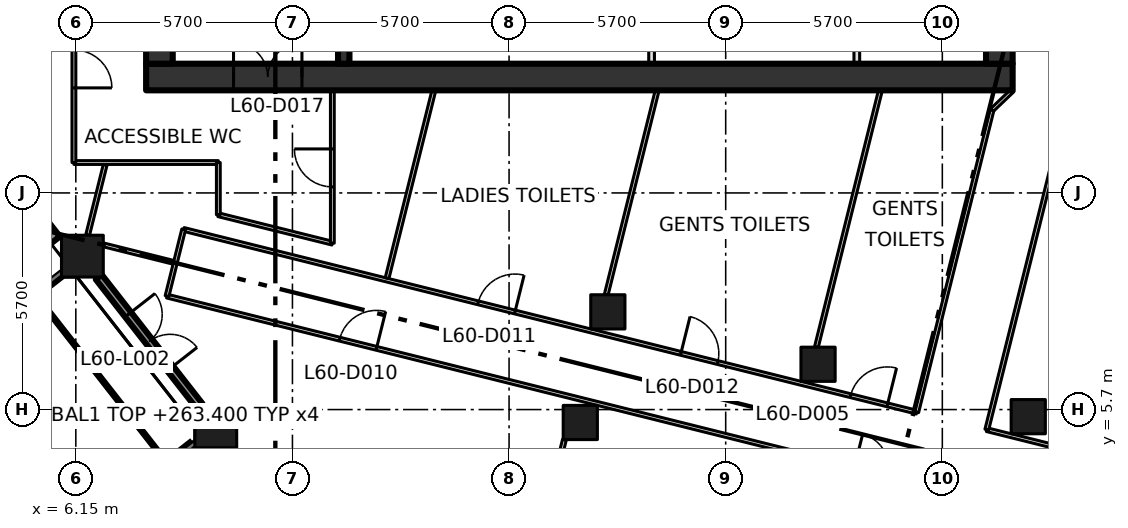
"""IFC4 building model, lengths in metres.
Left out: names, types, materials, properties, quantities, classifications, styles, units other than length and angle.
Written with IfcOpenShell. Run it as: python <this file> out.ifc"""

import sys

from ifc_helpers import new_model, si_unit, direction, frame, frame_2d, origin, origin_2d, place, context, subcontext, project, spatial, rectangle, extrude, element, fill, save


model = new_model("IFC4")
c1 = context("Model", 3, precision=1e-05, world=origin(), true_north=direction((0.0, 1.0)))
c2 = subcontext(c1, "Body", "Model", "MODEL_VIEW")
j1 = project(units=[si_unit("LENGTHUNIT", "METRE"), si_unit("PLANEANGLEUNIT", "RADIAN")], contexts=[c1])
p1 = place(None, origin())
s1 = spatial("IfcSite", under=j1, at=p1, CompositionType="ELEMENT")
p2 = place(p1, origin())
s2 = spatial("IfcBuilding", under=s1, at=p2, CompositionType="ELEMENT")
p3 = place(p2, frame((0.0, 0.0, 263.4)))
s3 = spatial("IfcBuildingStorey", under=s2, at=p3, CompositionType="ELEMENT", Elevation=263.4)
for number, where, z_axis, x_axis in (
    (1, (9.833, 5.245, 0.0), (0.0, 0.0, 1.0), (1.0, 0.0, 0.0)),
    (2, (6.323, 9.737, 0.0), (0.0, 0.0, 1.0), (1.0, 0.0, 0.0)),
):
    element("IfcColumn", number, at=place(p3, frame(where, z_axis=z_axis, x_axis=x_axis)), inside=s3, PredefinedType="COLUMN", context=c2, shape_type="SweptSolid", body=[
        extrude(rectangle(XDim=1.1, YDim=1.1, at=origin_2d()), origin(), (0.0, 0.0, 1.0), 4.2),
    ])
for number, where, z_axis, x_axis in (
    (3, (19.424, 5.36, 0.0), (0.0, 0.0, 1.0), (1.0, 0.0, 0.0)),
    (4, (20.149, 8.271, 0.0), (0.0, 0.0, 1.0), (1.0, 0.0, 0.0)),
    (5, (25.68, 6.892, 0.0), (0.0, 0.0, 1.0), (1.0, 0.0, 0.0)),
    (6, (31.211, 5.513, 0.0), (0.0, 0.0, 1.0), (1.0, 0.0, 0.0)),
):
    element("IfcColumn", number, at=place(p3, frame(where, z_axis=z_axis, x_axis=x_axis)), inside=s3, PredefinedType="COLUMN", context=c2, shape_type="SweptSolid", body=[
        extrude(rectangle(XDim=0.9, YDim=0.9, at=origin_2d()), origin(), (0.0, 0.0, 1.0), 4.2),
    ])
p4 = place(p3, frame((8.0, 14.45, -0.3), z_axis=(0.0, 0.0, 1.0), x_axis=(1.0, 0.0, 0.0)))
e7 = element("IfcWall", 7, at=p4, inside=s3, PredefinedType="SHEAR", context=c2, shape_type="SweptSolid", body=[
    extrude(rectangle(XDim=22.8, YDim=0.7, at=frame_2d((11.4, 0.0))), origin(), (0.0, 0.0, 1.0), 4.2),
])
p5 = place(p4, frame((2.3, 0.0, 0.3)))
e8 = element("IfcOpeningElement", 8, at=p5, cuts=e7, PredefinedType="OPENING", context=c2, shape_type="SweptSolid", body=[
    extrude(rectangle(XDim=1.8, YDim=2.1, at=frame_2d((0.9, 1.05))), frame((0.0, 0.36, 0.0), z_axis=(0.0, -1.0, 0.0), x_axis=(1.0, 0.0, 0.0)), (0.0, 0.0, 1.0), 0.72),
])
for number, where, z_axis, x_axis in (
    (9, (8.35, 14.8, -0.3), (0.0, 0.0, 1.0), (0.0, 1.0, 0.0)),
    (10, (30.45, 14.8, -0.3), (0.0, 0.0, 1.0), (0.0, 1.0, 0.0)),
):
    element("IfcWall", number, at=place(p3, frame(where, z_axis=z_axis, x_axis=x_axis)), inside=s3, PredefinedType="SHEAR", context=c2, shape_type="SweptSolid", body=[
        extrude(rectangle(XDim=20.9, YDim=0.7, at=frame_2d((10.45, 0.0))), origin(), (0.0, 0.0, 1.0), 4.2),
    ])
p6 = place(p3, frame((13.2, 14.8, 0.0), z_axis=(0.0, 0.0, 1.0), x_axis=(0.0, 1.0, 0.0)))
e11 = element("IfcWall", 11, at=p6, inside=s3, PredefinedType="SHEAR", context=c2, shape_type="SweptSolid", body=[
    extrude(rectangle(XDim=20.9, YDim=0.3, at=frame_2d((10.45, 0.0))), origin(), (0.0, 0.0, 1.0), 3.9),
])
p7 = place(p6, frame((3.5, 0.0, 0.0)))
e12 = element("IfcOpeningElement", 12, at=p7, cuts=e11, PredefinedType="OPENING", context=c2, shape_type="SweptSolid", body=[
    extrude(rectangle(XDim=1.8, YDim=2.1, at=frame_2d((0.9, 1.05))), frame((0.0, 0.16, 0.0), z_axis=(0.0, -1.0, 0.0), x_axis=(1.0, 0.0, 0.0)), (0.0, 0.0, 1.0), 0.32),
])
p8 = place(p6, frame((11.6, 0.0, 0.0)))
e13 = element("IfcOpeningElement", 13, at=p8, cuts=e11, PredefinedType="OPENING", context=c2, shape_type="SweptSolid", body=[
    extrude(rectangle(XDim=1.2, YDim=2.1, at=frame_2d((0.6, 1.05))), frame((0.0, 0.16, 0.0), z_axis=(0.0, -1.0, 0.0), x_axis=(1.0, 0.0, 0.0)), (0.0, 0.0, 1.0), 0.32),
])
for number, where, z_axis, x_axis in (
    (14, (21.3, 14.8, 0.0), (0.0, 0.0, 1.0), (0.0, 1.0, 0.0)),
    (15, (26.7, 14.8, 0.0), (0.0, 0.0, 1.0), (0.0, 1.0, 0.0)),
):
    element("IfcWall", number, at=place(p3, frame(where, z_axis=z_axis, x_axis=x_axis)), inside=s3, PredefinedType="PARTITIONING", context=c2, shape_type="SweptSolid", body=[
        extrude(rectangle(XDim=2.825, YDim=0.15, at=frame_2d((1.413, 0.0))), origin(), (0.0, 0.0, 1.0), 3.9),
    ])
p9 = place(p3, frame((3.053, 13.436, 0.0), z_axis=(0.0, 0.0, 1.0), x_axis=(0.615699893917, -0.787980736205, 0.0)))
e16 = element("IfcWall", 16, at=p9, inside=s3, PredefinedType="SOLIDWALL", context=c2, shape_type="SweptSolid", body=[
    extrude(rectangle(XDim=4.156, YDim=0.3, at=frame_2d((2.078, 0.0))), origin(), (0.0, 0.0, 1.0), 3.15),
])
p10 = place(p9, frame((0.878, 0.0, 0.8)))
e17 = element("IfcOpeningElement", 17, at=p10, cuts=e16, PredefinedType="OPENING", context=c2, shape_type="SweptSolid", body=[
    extrude(rectangle(XDim=2.4, YDim=2.1, at=frame_2d((1.2, 1.05))), frame((0.0, 0.16, 0.0), z_axis=(0.0, -1.0, 0.0), x_axis=(1.0, 0.0, 0.0)), (0.0, 0.0, 1.0), 0.32),
])
p11 = place(p3, frame((6.754, 9.187, 0.0), z_axis=(0.0, 0.0, 1.0), x_axis=(0.615514142447, -0.78812584049, 0.0)))
e18 = element("IfcWall", 18, at=p11, inside=s3, PredefinedType="SOLIDWALL", context=c2, shape_type="SweptSolid", body=[
    extrude(rectangle(XDim=4.304, YDim=0.2, at=frame_2d((2.152, 0.0))), origin(), (0.0, 0.0, 1.0), 3.15),
])
p12 = place(p11, frame((1.252, 0.0, 0.0)))
e19 = element("IfcOpeningElement", 19, at=p12, cuts=e18, PredefinedType="OPENING", context=c2, shape_type="SweptSolid", body=[
    extrude(rectangle(XDim=1.8, YDim=2.9, at=frame_2d((0.9, 1.45))), frame((0.0, 0.11, 0.0), z_axis=(0.0, -1.0, 0.0), x_axis=(1.0, 0.0, 0.0)), (0.0, 0.0, 1.0), 0.22),
])
p13 = place(p3, frame((6.1, 12.2, 0.0), z_axis=(0.0, 0.0, 1.0), x_axis=(1.0, 0.0, 0.0)))
e20 = element("IfcWall", 20, at=p13, inside=s3, PredefinedType="PARTITIONING", context=c2, shape_type="SweptSolid", body=[
    extrude(rectangle(XDim=3.8, YDim=0.1, at=frame_2d((1.9, 0.0))), origin(), (0.0, 0.0, 1.0), 3.9),
])
p14 = place(p3, frame((6.1, 38.9, 0.0), z_axis=(0.0, 0.0, 1.0), x_axis=(0.0, -1.0, 0.0)))
e21 = element("IfcWall", 21, at=p14, inside=s3, PredefinedType="PARTITIONING", context=c2, shape_type="SweptSolid", body=[
    extrude(rectangle(XDim=26.7, YDim=0.1, at=frame_2d((13.35, 0.0))), origin(), (0.0, 0.0, 1.0), 3.9),
])
p15 = place(p14, frame((23.736, 0.0, 0.0)))
e22 = element("IfcOpeningElement", 22, at=p15, cuts=e21, PredefinedType="OPENING", context=c2, shape_type="SweptSolid", body=[
    extrude(rectangle(XDim=1.0, YDim=2.1, at=frame_2d((0.5, 1.05))), frame((0.0, 0.06, 0.0), z_axis=(0.0, -1.0, 0.0), x_axis=(1.0, 0.0, 0.0)), (0.0, 0.0, 1.0), 0.12),
])
p16 = place(p14, frame((18.636, 0.0, 0.0)))
e23 = element("IfcOpeningElement", 23, at=p16, cuts=e21, PredefinedType="OPENING", context=c2, shape_type="SweptSolid", body=[
    extrude(rectangle(XDim=1.0, YDim=2.1, at=frame_2d((0.5, 1.05))), frame((0.0, 0.06, 0.0), z_axis=(0.0, -1.0, 0.0), x_axis=(1.0, 0.0, 0.0)), (0.0, 0.0, 1.0), 0.12),
])
p17 = place(p14, frame((10.436, 0.0, 0.0)))
e24 = element("IfcOpeningElement", 24, at=p17, cuts=e21, PredefinedType="OPENING", context=c2, shape_type="SweptSolid", body=[
    extrude(rectangle(XDim=1.0, YDim=2.1, at=frame_2d((0.5, 1.05))), frame((0.0, 0.06, 0.0), z_axis=(0.0, -1.0, 0.0), x_axis=(1.0, 0.0, 0.0)), (0.0, 0.0, 1.0), 0.12),
])
p18 = place(p14, frame((1.38, 0.0, 0.0)))
e25 = element("IfcOpeningElement", 25, at=p18, cuts=e21, PredefinedType="OPENING", context=c2, shape_type="SweptSolid", body=[
    extrude(rectangle(XDim=1.8, YDim=2.1, at=frame_2d((0.9, 1.05))), frame((0.0, 0.06, 0.0), z_axis=(0.0, -1.0, 0.0), x_axis=(1.0, 0.0, 0.0)), (0.0, 0.0, 1.0), 0.12),
])
p19 = place(p3, frame((8.55, 8.685, 0.0), z_axis=(0.0, 0.0, 1.0), x_axis=(0.970298026101, -0.241912671319, 0.0)))
e26 = element("IfcWall", 26, at=p19, inside=s3, PredefinedType="PARTITIONING", context=c2, shape_type="SweptSolid", body=[
    extrude(rectangle(XDim=51.275, YDim=0.1, at=frame_2d((25.637, 0.0))), origin(), (0.0, 0.0, 1.0), 3.9),
])
p20 = place(p19, frame((35.94, 0.0, 0.0)))
e27 = element("IfcOpeningElement", 27, at=p20, cuts=e26, PredefinedType="OPENING", context=c2, shape_type="SweptSolid", body=[
    extrude(rectangle(XDim=1.8, YDim=2.1, at=frame_2d((0.9, 1.05))), frame((0.0, 0.06, 0.0), z_axis=(0.0, -1.0, 0.0), x_axis=(1.0, 0.0, 0.0)), (0.0, 0.0, 1.0), 0.12),
])
p21 = place(p19, frame((41.34, 0.0, 0.0)))
e28 = element("IfcOpeningElement", 28, at=p21, cuts=e26, PredefinedType="OPENING", context=c2, shape_type="SweptSolid", body=[
    extrude(rectangle(XDim=1.0, YDim=2.1, at=frame_2d((0.5, 1.05))), frame((0.0, 0.06, 0.0), z_axis=(0.0, -1.0, 0.0), x_axis=(1.0, 0.0, 0.0)), (0.0, 0.0, 1.0), 0.12),
])
p22 = place(p19, frame((47.64, 0.0, 0.0)))
e29 = element("IfcOpeningElement", 29, at=p22, cuts=e26, PredefinedType="OPENING", context=c2, shape_type="SweptSolid", body=[
    extrude(rectangle(XDim=1.0, YDim=2.1, at=frame_2d((0.5, 1.05))), frame((0.0, 0.06, 0.0), z_axis=(0.0, -1.0, 0.0), x_axis=(1.0, 0.0, 0.0)), (0.0, 0.0, 1.0), 0.12),
])
p23 = place(p19, frame((18.639, 0.0, 0.0)))
e30 = element("IfcOpeningElement", 30, at=p23, cuts=e26, PredefinedType="OPENING", context=c2, shape_type="SweptSolid", body=[
    extrude(rectangle(XDim=1.8, YDim=2.1, at=frame_2d((0.9, 1.05))), frame((0.0, 0.06, 0.0), z_axis=(0.0, -1.0, 0.0), x_axis=(1.0, 0.0, 0.0)), (0.0, 0.0, 1.0), 0.12),
])
p24 = place(p19, frame((24.339, 0.0, 0.0)))
e31 = element("IfcOpeningElement", 31, at=p24, cuts=e26, PredefinedType="OPENING", context=c2, shape_type="SweptSolid", body=[
    extrude(rectangle(XDim=1.0, YDim=2.1, at=frame_2d((0.5, 1.05))), frame((0.0, 0.06, 0.0), z_axis=(0.0, -1.0, 0.0), x_axis=(1.0, 0.0, 0.0)), (0.0, 0.0, 1.0), 0.12),
])
p25 = place(p19, frame((4.68, 0.0, 0.0)))
e32 = element("IfcOpeningElement", 32, at=p25, cuts=e26, PredefinedType="OPENING", context=c2, shape_type="SweptSolid", body=[
    extrude(rectangle(XDim=1.0, YDim=2.1, at=frame_2d((0.5, 1.05))), frame((0.0, 0.06, 0.0), z_axis=(0.0, -1.0, 0.0), x_axis=(1.0, 0.0, 0.0)), (0.0, 0.0, 1.0), 0.12),
])
p26 = place(p3, frame((8.988, 10.44, 0.0), z_axis=(0.0, 0.0, 1.0), x_axis=(0.970301223092, -0.241899848006, 0.0)))
e33 = element("IfcWall", 33, at=p26, inside=s3, PredefinedType="PARTITIONING", context=c2, shape_type="SweptSolid", body=[
    extrude(rectangle(XDim=19.879, YDim=0.1, at=frame_2d((9.94, 0.0))), origin(), (0.0, 0.0, 1.0), 3.9),
])
p27 = place(p26, frame((18.083, 0.0, 0.0)))
e34 = element("IfcOpeningElement", 34, at=p27, cuts=e33, PredefinedType="OPENING", context=c2, shape_type="SweptSolid", body=[
    extrude(rectangle(XDim=1.0, YDim=2.1, at=frame_2d((0.5, 1.05))), frame((0.0, 0.06, 0.0), z_axis=(0.0, -1.0, 0.0), x_axis=(1.0, 0.0, 0.0)), (0.0, 0.0, 1.0), 0.12),
])
p28 = place(p26, frame((7.983, 0.0, 0.0)))
e35 = element("IfcOpeningElement", 35, at=p28, cuts=e33, PredefinedType="OPENING", context=c2, shape_type="SweptSolid", body=[
    extrude(rectangle(XDim=1.0, YDim=2.1, at=frame_2d((0.5, 1.05))), frame((0.0, 0.06, 0.0), z_axis=(0.0, -1.0, 0.0), x_axis=(1.0, 0.0, 0.0)), (0.0, 0.0, 1.0), 0.12),
])
p29 = place(p26, frame((13.483, 0.0, 0.0)))
e36 = element("IfcOpeningElement", 36, at=p29, cuts=e33, PredefinedType="OPENING", context=c2, shape_type="SweptSolid", body=[
    extrude(rectangle(XDim=1.0, YDim=2.1, at=frame_2d((0.5, 1.05))), frame((0.0, 0.06, 0.0), z_axis=(0.0, -1.0, 0.0), x_axis=(1.0, 0.0, 0.0)), (0.0, 0.0, 1.0), 0.12),
])
p30 = place(p3, frame((8.988, 10.44, 0.0), z_axis=(0.0, 0.0, 1.0), x_axis=(-0.242154485745, -0.970237705428, 0.0)))
e37 = element("IfcWall", 37, at=p30, inside=s3, PredefinedType="PARTITIONING", context=c2, shape_type="SweptSolid", body=[
    extrude(rectangle(XDim=1.809, YDim=0.1, at=frame_2d((0.904, 0.0))), origin(), (0.0, 0.0, 1.0), 3.9),
])
p31 = place(p3, frame((9.9, 10.826, 0.0), z_axis=(0.0, 0.0, 1.0), x_axis=(0.970290953223, -0.241941038466, 0.0)))
e38 = element("IfcWall", 38, at=p31, inside=s3, PredefinedType="PARTITIONING", context=c2, shape_type="SweptSolid", body=[
    extrude(rectangle(XDim=3.092, YDim=0.1, at=frame_2d((1.546, 0.0))), origin(), (0.0, 0.0, 1.0), 3.9),
])
p32 = place(p3, frame((9.9, 12.2, 0.0), z_axis=(0.0, 0.0, 1.0), x_axis=(0.0, -1.0, 0.0)))
e39 = element("IfcWall", 39, at=p32, inside=s3, PredefinedType="PARTITIONING", context=c2, shape_type="SweptSolid", body=[
    extrude(rectangle(XDim=1.374, YDim=0.1, at=frame_2d((0.687, 0.0))), origin(), (0.0, 0.0, 1.0), 3.9),
])
p33 = place(p3, frame((12.9, 10.078, 0.0), z_axis=(0.0, 0.0, 1.0), x_axis=(0.0, 1.0, 0.0)))
e40 = element("IfcWall", 40, at=p33, inside=s3, PredefinedType="PARTITIONING", context=c2, shape_type="SweptSolid", body=[
    extrude(rectangle(XDim=4.022, YDim=0.1, at=frame_2d((2.011, 0.0))), origin(), (0.0, 0.0, 1.0), 3.9),
])
p34 = place(p33, frame((1.48, 0.0, 0.0)))
e41 = element("IfcOpeningElement", 41, at=p34, cuts=e40, PredefinedType="OPENING", context=c2, shape_type="SweptSolid", body=[
    extrude(rectangle(XDim=1.0, YDim=2.1, at=frame_2d((0.5, 1.05))), frame((0.0, 0.06, 0.0), z_axis=(0.0, -1.0, 0.0), x_axis=(1.0, 0.0, 0.0)), (0.0, 0.0, 1.0), 0.12),
])
p35 = place(p3, frame((30.12, 5.171, 0.0), z_axis=(0.0, 0.0, 1.0), x_axis=(0.970293732398, -0.241929892467, 0.0)))
e42 = element("IfcWall", 42, at=p35, inside=s3, PredefinedType="PARTITIONING", context=c2, shape_type="SweptSolid", body=[
    extrude(rectangle(XDim=29.496, YDim=0.1, at=frame_2d((14.748, 0.0))), origin(), (0.0, 0.0, 1.0), 3.9),
])
p36 = place(p35, frame((8.08, 0.0, 0.0)))
e43 = element("IfcOpeningElement", 43, at=p36, cuts=e42, PredefinedType="OPENING", context=c2, shape_type="SweptSolid", body=[
    extrude(rectangle(XDim=1.8, YDim=2.1, at=frame_2d((0.9, 1.05))), frame((0.0, 0.06, 0.0), z_axis=(0.0, -1.0, 0.0), x_axis=(1.0, 0.0, 0.0)), (0.0, 0.0, 1.0), 0.12),
])
p37 = place(p3, frame((30.12, 5.171, 0.0), z_axis=(0.0, 0.0, 1.0), x_axis=(0.241902913229, 0.970300458915, 0.0)))
e44 = element("IfcWall", 44, at=p37, inside=s3, PredefinedType="PARTITIONING", context=c2, shape_type="SweptSolid", body=[
    extrude(rectangle(XDim=8.172, YDim=0.1, at=frame_2d((4.086, 0.0))), origin(), (0.0, 0.0, 1.0), 3.9),
])
p38 = place(p3, frame((30.259, 13.583, 0.0), z_axis=(0.0, 0.0, 1.0), x_axis=(-0.241841612879, -0.970315739479, 0.0)))
e45 = element("IfcWall", 45, at=p38, inside=s3, PredefinedType="PARTITIONING", context=c2, shape_type="SweptSolid", body=[
    extrude(rectangle(XDim=8.195, YDim=0.1, at=frame_2d((4.098, 0.0))), origin(), (0.0, 0.0, 1.0), 3.9),
])
p39 = place(p3, frame((30.8, 14.1, 0.0), z_axis=(0.0, 0.0, 1.0), x_axis=(-0.722911025189, -0.690941133281, 0.0)))
e46 = element("IfcWall", 46, at=p39, inside=s3, PredefinedType="PARTITIONING", context=c2, shape_type="SweptSolid", body=[
    extrude(rectangle(XDim=0.748, YDim=0.1, at=frame_2d((0.374, 0.0))), origin(), (0.0, 0.0, 1.0), 3.9),
])
p40 = place(p3, frame((6.922, 12.138, 0.0), z_axis=(0.0, 0.0, 1.0), x_axis=(-0.242264600824, -0.970210215978, 0.0)))
e47 = element("IfcWall", 47, at=p40, inside=s3, PredefinedType="PARTITIONING", context=c2, shape_type="SweptSolid", body=[
    extrude(rectangle(XDim=1.908, YDim=0.1, at=frame_2d((0.954, 0.0))), origin(), (0.0, 0.0, 1.0), 3.9),
])
p41 = place(p3, frame((8.72, 9.574, 0.0), z_axis=(0.0, 0.0, 1.0), x_axis=(-0.970240497311, 0.242143299263, 0.0)))
e48 = element("IfcWall", 48, at=p41, inside=s3, PredefinedType="PARTITIONING", context=c2, shape_type="SweptSolid", body=[
    extrude(rectangle(XDim=1.904, YDim=0.1, at=frame_2d((0.952, 0.0))), origin(), (0.0, 0.0, 1.0), 3.9),
])
p42 = place(p3, frame((14.34, 9.158, 0.0), z_axis=(0.0, 0.0, 1.0), x_axis=(0.241870144538, 0.970308627799, 0.0)))
e49 = element("IfcWall", 49, at=p42, inside=s3, PredefinedType="PARTITIONING", context=c2, shape_type="SweptSolid", body=[
    extrude(rectangle(XDim=5.093, YDim=0.1, at=frame_2d((2.547, 0.0))), origin(), (0.0, 0.0, 1.0), 3.9),
])
p43 = place(p3, frame((16.988, -3.188, 0.0), z_axis=(0.0, 0.0, 1.0), x_axis=(0.241922982745, 0.97029545522, 0.0)))
e50 = element("IfcWall", 50, at=p43, inside=s3, PredefinedType="PARTITIONING", context=c2, shape_type="SweptSolid", body=[
    extrude(rectangle(XDim=8.346, YDim=0.1, at=frame_2d((4.173, 0.0))), origin(), (0.0, 0.0, 1.0), 3.9),
])
p44 = place(p3, frame((20.106, 8.721, 0.0), z_axis=(0.0, 0.0, 1.0), x_axis=(0.24190349153, 0.970300314741, 0.0)))
e51 = element("IfcWall", 51, at=p44, inside=s3, PredefinedType="PARTITIONING", context=c2, shape_type="SweptSolid", body=[
    extrude(rectangle(XDim=5.544, YDim=0.1, at=frame_2d((2.772, 0.0))), origin(), (0.0, 0.0, 1.0), 3.9),
])
p45 = place(p3, frame((25.636, 7.342, 0.0), z_axis=(0.0, 0.0, 1.0), x_axis=(0.241933497251, 0.970292833586, 0.0)))
e52 = element("IfcWall", 52, at=p45, inside=s3, PredefinedType="PARTITIONING", context=c2, shape_type="SweptSolid", body=[
    extrude(rectangle(XDim=6.965, YDim=0.1, at=frame_2d((3.482, 0.0))), origin(), (0.0, 0.0, 1.0), 3.9),
])
p46 = place(p5, origin())
e53 = element("IfcDoor", 53, at=p46, inside=s3, OperationType="DOUBLE_DOOR_SINGLE_SWING", PredefinedType="DOOR", context=c2, shape_type="SweptSolid", body=[
    extrude(rectangle(XDim=1.8, YDim=2.1, at=frame_2d((0.9, 1.05))), frame((0.0, 0.025, 0.0), z_axis=(0.0, -1.0, 0.0), x_axis=(1.0, 0.0, 0.0)), (0.0, 0.0, 1.0), 0.05),
])
fill(e8, e53)
p47 = place(p12, origin())
e54 = element("IfcDoor", 54, at=p47, inside=s3, OperationType="DOUBLE_DOOR_SINGLE_SWING", PredefinedType="DOOR", context=c2, shape_type="SweptSolid", body=[
    extrude(rectangle(XDim=1.8, YDim=2.9, at=frame_2d((0.9, 1.45))), frame((0.0, 0.025, 0.0), z_axis=(0.0, -1.0, 0.0), x_axis=(1.0, 0.0, 0.0)), (0.0, 0.0, 1.0), 0.05),
])
fill(e19, e54)
p48 = place(p27, origin())
e55 = element("IfcDoor", 55, at=p48, inside=s3, OperationType="SINGLE_SWING_RIGHT", PredefinedType="DOOR", context=c2, shape_type="SweptSolid", body=[
    extrude(rectangle(XDim=1.0, YDim=2.1, at=frame_2d((0.5, 1.05))), frame((0.0, 0.025, 0.0), z_axis=(0.0, -1.0, 0.0), x_axis=(1.0, 0.0, 0.0)), (0.0, 0.0, 1.0), 0.05),
])
fill(e34, e55)
p49 = place(p25, origin())
e56 = element("IfcDoor", 56, at=p49, inside=s3, OperationType="SINGLE_SWING_RIGHT", PredefinedType="DOOR", context=c2, shape_type="SweptSolid", body=[
    extrude(rectangle(XDim=1.0, YDim=2.1, at=frame_2d((0.5, 1.05))), frame((0.0, 0.025, 0.0), z_axis=(0.0, -1.0, 0.0), x_axis=(1.0, 0.0, 0.0)), (0.0, 0.0, 1.0), 0.05),
])
fill(e32, e56)
p50 = place(p28, origin())
e57 = element("IfcDoor", 57, at=p50, inside=s3, OperationType="SINGLE_SWING_RIGHT", PredefinedType="DOOR", context=c2, shape_type="SweptSolid", body=[
    extrude(rectangle(XDim=1.0, YDim=2.1, at=frame_2d((0.5, 1.05))), frame((0.0, 0.025, 0.0), z_axis=(0.0, -1.0, 0.0), x_axis=(1.0, 0.0, 0.0)), (0.0, 0.0, 1.0), 0.05),
])
fill(e35, e57)
p51 = place(p29, origin())
e58 = element("IfcDoor", 58, at=p51, inside=s3, OperationType="SINGLE_SWING_LEFT", PredefinedType="DOOR", context=c2, shape_type="SweptSolid", body=[
    extrude(rectangle(XDim=1.0, YDim=2.1, at=frame_2d((0.5, 1.05))), frame((0.0, 0.025, 0.0), z_axis=(0.0, -1.0, 0.0), x_axis=(1.0, 0.0, 0.0)), (0.0, 0.0, 1.0), 0.05),
])
fill(e36, e58)
p52 = place(p15, origin())
e59 = element("IfcDoor", 59, at=p52, inside=s3, OperationType="SINGLE_SWING_RIGHT", PredefinedType="DOOR", context=c2, shape_type="SweptSolid", body=[
    extrude(rectangle(XDim=1.0, YDim=2.1, at=frame_2d((0.5, 1.05))), frame((0.0, 0.025, 0.0), z_axis=(0.0, -1.0, 0.0), x_axis=(1.0, 0.0, 0.0)), (0.0, 0.0, 1.0), 0.05),
])
fill(e22, e59)
p53 = place(p34, origin())
e60 = element("IfcDoor", 60, at=p53, inside=s3, OperationType="SINGLE_SWING_RIGHT", PredefinedType="DOOR", context=c2, shape_type="SweptSolid", body=[
    extrude(rectangle(XDim=1.0, YDim=2.1, at=frame_2d((0.5, 1.05))), frame((0.0, 0.025, 0.0), z_axis=(0.0, -1.0, 0.0), x_axis=(1.0, 0.0, 0.0)), (0.0, 0.0, 1.0), 0.05),
])
fill(e41, e60)
save(model, sys.argv[1])
